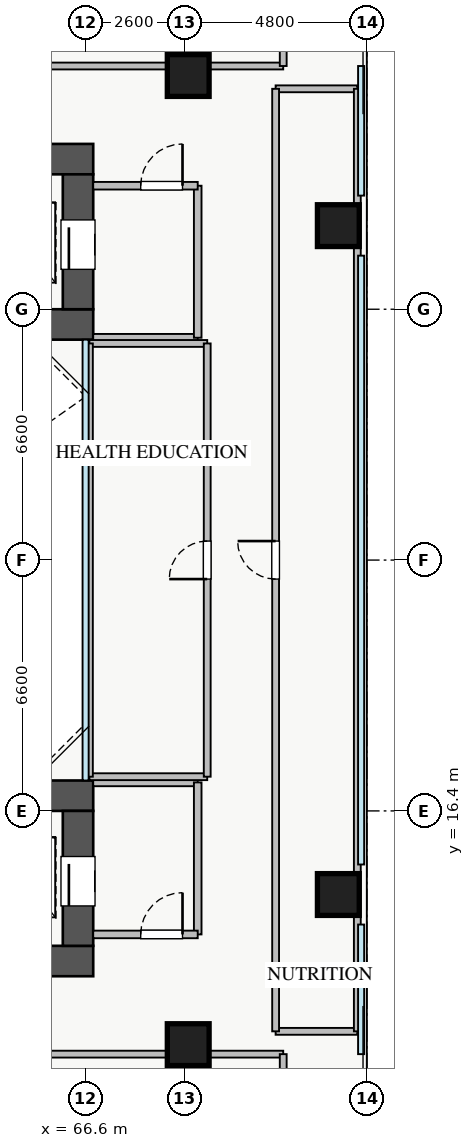
"""IFC4 building model, lengths in metres.
Left out: names, types, materials, properties, quantities, classifications, styles, units other than length and angle.
Written with IfcOpenShell. Run it as: python <this file> out.ifc"""

import sys

from ifc_helpers import new_model, si_unit, direction, frame, frame_2d, origin, origin_2d, place, context, subcontext, project, spatial, rectangle, extrude, source, transform, mapped, element, fill, save


model = new_model("IFC4")
c1 = context("Model", 3, precision=1e-05, world=origin(), true_north=direction((0.0, 1.0)))
c2 = subcontext(c1, "Body", "Model", "MODEL_VIEW")
j1 = project(units=[si_unit("LENGTHUNIT", "METRE"), si_unit("PLANEANGLEUNIT", "RADIAN")], contexts=[c1])
p1 = place(None, origin())
s1 = spatial("IfcSite", under=j1, at=p1, CompositionType="ELEMENT")
p2 = place(p1, origin())
s2 = spatial("IfcBuilding", under=s1, at=p2, CompositionType="ELEMENT")
p3 = place(p2, frame((0.0, 0.0, 9.4)))
s3 = spatial("IfcBuildingStorey", under=s2, at=p3, CompositionType="ELEMENT", Elevation=9.4)
p4 = place(p3, frame((54.2, 29.2, 0.0), z_axis=(0.0, 0.0, 1.0), x_axis=(1.0, 0.0, 0.0)))
e1 = element("IfcWall", 1, at=p4, inside=s3, PredefinedType="SHEAR", context=c2, shape_type="SweptSolid", body=[
    extrude(rectangle(XDim=12.6, YDim=0.8, at=frame_2d((6.3, 0.0))), origin(), (0.0, 0.0, 1.0), 4.4),
])
p5 = place(p3, frame((54.2, 33.55, 0.0), z_axis=(0.0, 0.0, 1.0), x_axis=(1.0, 0.0, 0.0)))
e2 = element("IfcWall", 2, at=p5, inside=s3, PredefinedType="SHEAR", context=c2, shape_type="SweptSolid", body=[
    extrude(rectangle(XDim=12.6, YDim=0.8, at=frame_2d((6.3, 0.0))), origin(), (0.0, 0.0, 1.0), 4.4),
])
p6 = place(p5, frame((8.2, 0.0, 0.0)))
e3 = element("IfcOpeningElement", 3, at=p6, cuts=e2, PredefinedType="OPENING", context=c2, shape_type="SweptSolid", body=[
    extrude(rectangle(XDim=1.1, YDim=2.05, at=frame_2d((0.55, 1.025))), frame((0.0, 0.41, 0.0), z_axis=(0.0, -1.0, 0.0), x_axis=(1.0, 0.0, 0.0)), (0.0, 0.0, 1.0), 0.82),
])
p7 = place(p3, frame((66.4, 29.6, 0.0), z_axis=(0.0, 0.0, 1.0), x_axis=(0.0, 1.0, 0.0)))
e4 = element("IfcWall", 4, at=p7, inside=s3, PredefinedType="SHEAR", context=c2, shape_type="SweptSolid", body=[
    extrude(rectangle(XDim=3.55, YDim=0.8, at=frame_2d((1.775, 0.0))), origin(), (0.0, 0.0, 1.0), 4.4),
])
p8 = place(p7, frame((1.05, 0.0, 0.0)))
e5 = element("IfcOpeningElement", 5, at=p8, cuts=e4, PredefinedType="OPENING", context=c2, shape_type="SweptSolid", body=[
    extrude(rectangle(XDim=1.3, YDim=2.05, at=frame_2d((0.65, 1.025))), frame((0.0, 0.41, 0.0), z_axis=(0.0, -1.0, 0.0), x_axis=(1.0, 0.0, 0.0)), (0.0, 0.0, 1.0), 0.82),
])
p9 = place(p3, frame((54.2, 12.45, 0.0), z_axis=(0.0, 0.0, 1.0), x_axis=(1.0, 0.0, 0.0)))
e6 = element("IfcWall", 6, at=p9, inside=s3, PredefinedType="SHEAR", context=c2, shape_type="SweptSolid", body=[
    extrude(rectangle(XDim=12.6, YDim=0.8, at=frame_2d((6.3, 0.0))), origin(), (0.0, 0.0, 1.0), 4.4),
])
p10 = place(p9, frame((8.2, 0.0, 0.0)))
e7 = element("IfcOpeningElement", 7, at=p10, cuts=e6, PredefinedType="OPENING", context=c2, shape_type="SweptSolid", body=[
    extrude(rectangle(XDim=1.1, YDim=2.05, at=frame_2d((0.55, 1.025))), frame((0.0, 0.41, 0.0), z_axis=(0.0, -1.0, 0.0), x_axis=(1.0, 0.0, 0.0)), (0.0, 0.0, 1.0), 0.82),
])
p11 = place(p3, frame((54.2, 16.8, 0.0), z_axis=(0.0, 0.0, 1.0), x_axis=(1.0, 0.0, 0.0)))
e8 = element("IfcWall", 8, at=p11, inside=s3, PredefinedType="SHEAR", context=c2, shape_type="SweptSolid", body=[
    extrude(rectangle(XDim=12.6, YDim=0.8, at=frame_2d((6.3, 0.0))), origin(), (0.0, 0.0, 1.0), 4.4),
])
p12 = place(p3, frame((66.4, 12.85, 0.0), z_axis=(0.0, 0.0, 1.0), x_axis=(0.0, 1.0, 0.0)))
e9 = element("IfcWall", 9, at=p12, inside=s3, PredefinedType="SHEAR", context=c2, shape_type="SweptSolid", body=[
    extrude(rectangle(XDim=3.55, YDim=0.8, at=frame_2d((1.775, 0.0))), origin(), (0.0, 0.0, 1.0), 4.4),
])
p13 = place(p12, frame((1.05, 0.0, 0.0)))
e10 = element("IfcOpeningElement", 10, at=p13, cuts=e9, PredefinedType="OPENING", context=c2, shape_type="SweptSolid", body=[
    extrude(rectangle(XDim=1.3, YDim=2.05, at=frame_2d((0.65, 1.025))), frame((0.0, 0.41, 0.0), z_axis=(0.0, -1.0, 0.0), x_axis=(1.0, 0.0, 0.0)), (0.0, 0.0, 1.0), 0.82),
])
m1 = source(origin(), c2, "Body", "SweptSolid", [
    extrude(rectangle(XDim=1.1, YDim=1.1, at=origin_2d()), origin(), (0.0, 0.0, 1.0), 4.4),
])
for number, where, z_axis, x_axis in (
    (11, (69.3, 10.25, 0.0), (0.0, 0.0, 1.0), (1.0, 0.0, 0.0)),
    (12, (73.25, 14.2, 0.0), (0.0, 0.0, 1.0), (1.0, 0.0, 0.0)),
    (13, (73.25, 31.8, 0.0), (0.0, 0.0, 1.0), (1.0, 0.0, 0.0)),
    (14, (69.3, 35.75, 0.0), (0.0, 0.0, 1.0), (1.0, 0.0, 0.0)),
):
    element("IfcColumn", number, at=place(p3, frame(where, z_axis=z_axis, x_axis=x_axis)), inside=s3, PredefinedType="COLUMN", context=c2, shape_type="MappedRepresentation", body=[
        mapped(m1, transform((0.0, 0.0, 0.0), x_axis=(1.0, 0.0, 0.0), y_axis=(0.0, 1.0, 0.0), z_axis=(0.0, 0.0, 1.0), scale=1.0)),
    ])
p14 = place(p3, frame((66.8, 28.85, 0.0), z_axis=(0.0, 0.0, 1.0), x_axis=(1.0, 0.0, 0.0)))
e15 = element("IfcWall", 15, at=p14, inside=s3, PredefinedType="PARTITIONING", context=c2, shape_type="SweptSolid", body=[
    extrude(rectangle(XDim=2.75, YDim=0.2, at=frame_2d((1.375, 0.0))), origin(), (0.0, 0.0, 1.0), 4.18),
])
p15 = place(p3, frame((69.55, 28.85, 0.0), z_axis=(0.0, 0.0, 1.0), x_axis=(0.0, 1.0, 0.0)))
e16 = element("IfcWall", 16, at=p15, inside=s3, PredefinedType="PARTITIONING", context=c2, shape_type="SweptSolid", body=[
    extrude(rectangle(XDim=4.0, YDim=0.2, at=frame_2d((2.0, 0.0))), origin(), (0.0, 0.0, 1.0), 4.18),
])
p16 = place(p3, frame((66.8, 32.85, 0.0), z_axis=(0.0, 0.0, 1.0), x_axis=(1.0, 0.0, 0.0)))
e17 = element("IfcWall", 17, at=p16, inside=s3, PredefinedType="PARTITIONING", context=c2, shape_type="SweptSolid", body=[
    extrude(rectangle(XDim=2.75, YDim=0.2, at=frame_2d((1.375, 0.0))), origin(), (0.0, 0.0, 1.0), 4.18),
])
p17 = place(p16, frame((1.25, 0.0, 0.0)))
e18 = element("IfcOpeningElement", 18, at=p17, cuts=e17, PredefinedType="OPENING", context=c2, shape_type="SweptSolid", body=[
    extrude(rectangle(XDim=1.1, YDim=2.05, at=frame_2d((0.55, 1.025))), frame((0.0, 0.11, 0.0), z_axis=(0.0, -1.0, 0.0), x_axis=(1.0, 0.0, 0.0)), (0.0, 0.0, 1.0), 0.22),
])
p18 = place(p3, frame((66.8, 17.15, 0.0), z_axis=(0.0, 0.0, 1.0), x_axis=(1.0, 0.0, 0.0)))
e19 = element("IfcWall", 19, at=p18, inside=s3, PredefinedType="PARTITIONING", context=c2, shape_type="SweptSolid", body=[
    extrude(rectangle(XDim=2.75, YDim=0.2, at=frame_2d((1.375, 0.0))), origin(), (0.0, 0.0, 1.0), 4.18),
])
p19 = place(p3, frame((69.55, 13.15, 0.0), z_axis=(0.0, 0.0, 1.0), x_axis=(0.0, 1.0, 0.0)))
e20 = element("IfcWall", 20, at=p19, inside=s3, PredefinedType="PARTITIONING", context=c2, shape_type="SweptSolid", body=[
    extrude(rectangle(XDim=4.0, YDim=0.2, at=frame_2d((2.0, 0.0))), origin(), (0.0, 0.0, 1.0), 4.18),
])
p20 = place(p3, frame((66.8, 13.15, 0.0), z_axis=(0.0, 0.0, 1.0), x_axis=(1.0, 0.0, 0.0)))
e21 = element("IfcWall", 21, at=p20, inside=s3, PredefinedType="PARTITIONING", context=c2, shape_type="SweptSolid", body=[
    extrude(rectangle(XDim=2.75, YDim=0.2, at=frame_2d((1.375, 0.0))), origin(), (0.0, 0.0, 1.0), 4.18),
])
p21 = place(p20, frame((1.25, 0.0, 0.0)))
e22 = element("IfcOpeningElement", 22, at=p21, cuts=e21, PredefinedType="OPENING", context=c2, shape_type="SweptSolid", body=[
    extrude(rectangle(XDim=1.1, YDim=2.05, at=frame_2d((0.55, 1.025))), frame((0.0, 0.11, 0.0), z_axis=(0.0, -1.0, 0.0), x_axis=(1.0, 0.0, 0.0)), (0.0, 0.0, 1.0), 0.22),
])
for number, where, z_axis, x_axis in (
    (23, (66.7, 17.3, 0.0), (0.0, 0.0, 1.0), (1.0, 0.0, 0.0)),
    (24, (66.7, 28.7, 0.0), (0.0, 0.0, 1.0), (1.0, 0.0, 0.0)),
):
    element("IfcWall", number, at=place(p3, frame(where, z_axis=z_axis, x_axis=x_axis)), inside=s3, PredefinedType="PARTITIONING", context=c2, shape_type="SweptSolid", body=[
        extrude(rectangle(XDim=3.1, YDim=0.18, at=frame_2d((1.55, 0.0))), origin(), (0.0, 0.0, 1.0), 4.18),
    ])
p22 = place(p3, frame((66.7, 17.3, 0.0), z_axis=(0.0, 0.0, 1.0), x_axis=(0.0, 1.0, 0.0)))
e25 = element("IfcWall", 25, at=p22, inside=s3, PredefinedType="PARTITIONING", context=c2, shape_type="SweptSolid", body=[
    extrude(rectangle(XDim=11.4, YDim=0.18, at=frame_2d((5.7, 0.0))), origin(), (0.0, 0.0, 1.0), 4.18),
])
p23 = place(p3, frame((69.8, 17.3, 0.0), z_axis=(0.0, 0.0, 1.0), x_axis=(0.0, 1.0, 0.0)))
e26 = element("IfcWall", 26, at=p23, inside=s3, PredefinedType="PARTITIONING", context=c2, shape_type="SweptSolid", body=[
    extrude(rectangle(XDim=11.4, YDim=0.18, at=frame_2d((5.7, 0.0))), origin(), (0.0, 0.0, 1.0), 4.18),
])
p24 = place(p23, frame((5.2, 0.0, 0.0)))
e27 = element("IfcOpeningElement", 27, at=p24, cuts=e26, PredefinedType="OPENING", context=c2, shape_type="SweptSolid", body=[
    extrude(rectangle(XDim=1.0, YDim=2.05, at=frame_2d((0.5, 1.025))), frame((0.0, 0.1, 0.0), z_axis=(0.0, -1.0, 0.0), x_axis=(1.0, 0.0, 0.0)), (0.0, 0.0, 1.0), 0.2),
])
for number, where, z_axis, x_axis in (
    (28, (71.6, 10.6, 0.0), (0.0, 0.0, 1.0), (1.0, 0.0, 0.0)),
    (29, (71.6, 35.4, 0.0), (0.0, 0.0, 1.0), (1.0, 0.0, 0.0)),
):
    element("IfcWall", number, at=place(p3, frame(where, z_axis=z_axis, x_axis=x_axis)), inside=s3, PredefinedType="PARTITIONING", context=c2, shape_type="SweptSolid", body=[
        extrude(rectangle(XDim=2.15, YDim=0.18, at=frame_2d((1.075, 0.0))), origin(), (0.0, 0.0, 1.0), 4.18),
    ])
p25 = place(p3, frame((71.6, 10.6, 0.0), z_axis=(0.0, 0.0, 1.0), x_axis=(0.0, 1.0, 0.0)))
e30 = element("IfcWall", 30, at=p25, inside=s3, PredefinedType="PARTITIONING", context=c2, shape_type="SweptSolid", body=[
    extrude(rectangle(XDim=24.8, YDim=0.18, at=frame_2d((12.4, 0.0))), origin(), (0.0, 0.0, 1.0), 4.18),
])
p26 = place(p25, frame((11.9, 0.0, 0.0)))
e31 = element("IfcOpeningElement", 31, at=p26, cuts=e30, PredefinedType="OPENING", context=c2, shape_type="SweptSolid", body=[
    extrude(rectangle(XDim=1.0, YDim=2.05, at=frame_2d((0.5, 1.025))), frame((0.0, 0.1, 0.0), z_axis=(0.0, -1.0, 0.0), x_axis=(1.0, 0.0, 0.0)), (0.0, 0.0, 1.0), 0.2),
])
p27 = place(p3, frame((73.75, 10.6, 0.0), z_axis=(0.0, 0.0, 1.0), x_axis=(0.0, 1.0, 0.0)))
e32 = element("IfcWall", 32, at=p27, inside=s3, PredefinedType="PARTITIONING", context=c2, shape_type="SweptSolid", body=[
    extrude(rectangle(XDim=24.8, YDim=0.18, at=frame_2d((12.4, 0.0))), origin(), (0.0, 0.0, 1.0), 4.18),
])
p28 = place(p3, frame((54.2, 10.0, 0.0), z_axis=(0.0, 0.0, 1.0), x_axis=(1.0, 0.0, 0.0)))
e33 = element("IfcWall", 33, at=p28, inside=s3, PredefinedType="PARTITIONING", context=c2, shape_type="SweptSolid", body=[
    extrude(rectangle(XDim=17.6, YDim=0.18, at=frame_2d((8.8, 0.0))), origin(), (0.0, 0.0, 1.0), 3.675),
])
p29 = place(p28, frame((8.3, 0.0, 0.0)))
e34 = element("IfcOpeningElement", 34, at=p29, cuts=e33, PredefinedType="OPENING", context=c2, shape_type="SweptSolid", body=[
    extrude(rectangle(XDim=1.0, YDim=2.05, at=frame_2d((0.5, 1.025))), frame((0.0, 0.1, 0.0), z_axis=(0.0, -1.0, 0.0), x_axis=(1.0, 0.0, 0.0)), (0.0, 0.0, 1.0), 0.2),
])
p30 = place(p3, frame((71.8, 4.4, 0.0), z_axis=(0.0, 0.0, 1.0), x_axis=(0.0, 1.0, 0.0)))
e35 = element("IfcWall", 35, at=p30, inside=s3, PredefinedType="PARTITIONING", context=c2, shape_type="SweptSolid", body=[
    extrude(rectangle(XDim=5.6, YDim=0.18, at=frame_2d((2.8, 0.0))), origin(), (0.0, 0.0, 1.0), 4.18),
])
p31 = place(p3, frame((54.2, 36.0, 0.0), z_axis=(0.0, 0.0, 1.0), x_axis=(1.0, 0.0, 0.0)))
e36 = element("IfcWall", 36, at=p31, inside=s3, PredefinedType="PARTITIONING", context=c2, shape_type="SweptSolid", body=[
    extrude(rectangle(XDim=17.6, YDim=0.18, at=frame_2d((8.8, 0.0))), origin(), (0.0, 0.0, 1.0), 3.675),
])
p32 = place(p31, frame((8.3, 0.0, 0.0)))
e37 = element("IfcOpeningElement", 37, at=p32, cuts=e36, PredefinedType="OPENING", context=c2, shape_type="SweptSolid", body=[
    extrude(rectangle(XDim=1.0, YDim=2.05, at=frame_2d((0.5, 1.025))), frame((0.0, 0.1, 0.0), z_axis=(0.0, -1.0, 0.0), x_axis=(1.0, 0.0, 0.0)), (0.0, 0.0, 1.0), 0.2),
])
p33 = place(p3, frame((71.8, 36.0, 0.0), z_axis=(0.0, 0.0, 1.0), x_axis=(0.0, 1.0, 0.0)))
e38 = element("IfcWall", 38, at=p33, inside=s3, PredefinedType="PARTITIONING", context=c2, shape_type="SweptSolid", body=[
    extrude(rectangle(XDim=5.6, YDim=0.18, at=frame_2d((2.8, 0.0))), origin(), (0.0, 0.0, 1.0), 4.18),
])
m2 = source(origin(), c2, "Body", "SweptSolid", [
    extrude(rectangle(XDim=1.3, YDim=2.05, at=frame_2d((0.65, 1.025))), frame((0.0, 0.025, 0.0), z_axis=(0.0, -1.0, 0.0), x_axis=(1.0, 0.0, 0.0)), (0.0, 0.0, 1.0), 0.05),
])
p34 = place(p8, origin())
e39 = element("IfcDoor", 39, at=p34, inside=s3, OperationType="SLIDING_TO_LEFT", PredefinedType="DOOR", context=c2, shape_type="MappedRepresentation", body=[
    mapped(m2, transform((0.0, 0.0, 0.0), x_axis=(1.0, 0.0, 0.0), y_axis=(0.0, 1.0, 0.0), z_axis=(0.0, 0.0, 1.0), scale=1.0)),
])
fill(e5, e39)
p35 = place(p13, origin())
e40 = element("IfcDoor", 40, at=p35, inside=s3, OperationType="SLIDING_TO_RIGHT", PredefinedType="DOOR", context=c2, shape_type="MappedRepresentation", body=[
    mapped(m2, transform((0.0, 0.0, 0.0), x_axis=(1.0, 0.0, 0.0), y_axis=(0.0, 1.0, 0.0), z_axis=(0.0, 0.0, 1.0), scale=1.0)),
])
fill(e10, e40)
m3 = source(origin(), c2, "Body", "SweptSolid", [
    extrude(rectangle(XDim=1.1, YDim=2.05, at=frame_2d((0.55, 1.025))), frame((0.0, 0.025, 0.0), z_axis=(0.0, -1.0, 0.0), x_axis=(1.0, 0.0, 0.0)), (0.0, 0.0, 1.0), 0.05),
])
p36 = place(p17, origin())
e41 = element("IfcDoor", 41, at=p36, inside=s3, OperationType="SINGLE_SWING_RIGHT", PredefinedType="DOOR", context=c2, shape_type="MappedRepresentation", body=[
    mapped(m3, transform((0.0, 0.0, 0.0), x_axis=(1.0, 0.0, 0.0), y_axis=(0.0, 1.0, 0.0), z_axis=(0.0, 0.0, 1.0), scale=1.0)),
])
fill(e18, e41)
p37 = place(p21, origin())
e42 = element("IfcDoor", 42, at=p37, inside=s3, OperationType="SINGLE_SWING_RIGHT", PredefinedType="DOOR", context=c2, shape_type="MappedRepresentation", body=[
    mapped(m3, transform((0.0, 0.0, 0.0), x_axis=(1.0, 0.0, 0.0), y_axis=(0.0, 1.0, 0.0), z_axis=(0.0, 0.0, 1.0), scale=1.0)),
])
fill(e22, e42)
m4 = source(origin(), c2, "Body", "SweptSolid", [
    extrude(rectangle(XDim=1.0, YDim=2.05, at=frame_2d((0.5, 1.025))), frame((0.0, 0.025, 0.0), z_axis=(0.0, -1.0, 0.0), x_axis=(1.0, 0.0, 0.0)), (0.0, 0.0, 1.0), 0.05),
])
p38 = place(p24, origin())
e43 = element("IfcDoor", 43, at=p38, inside=s3, OperationType="SINGLE_SWING_LEFT", PredefinedType="DOOR", context=c2, shape_type="MappedRepresentation", body=[
    mapped(m4, transform((0.0, 0.0, 0.0), x_axis=(1.0, 0.0, 0.0), y_axis=(0.0, 1.0, 0.0), z_axis=(0.0, 0.0, 1.0), scale=1.0)),
])
fill(e27, e43)
p39 = place(p26, origin())
e44 = element("IfcDoor", 44, at=p39, inside=s3, OperationType="SINGLE_SWING_RIGHT", PredefinedType="DOOR", context=c2, shape_type="MappedRepresentation", body=[
    mapped(m4, transform((0.0, 0.0, 0.0), x_axis=(1.0, 0.0, 0.0), y_axis=(0.0, 1.0, 0.0), z_axis=(0.0, 0.0, 1.0), scale=1.0)),
])
fill(e31, e44)
save(model, sys.argv[1])
